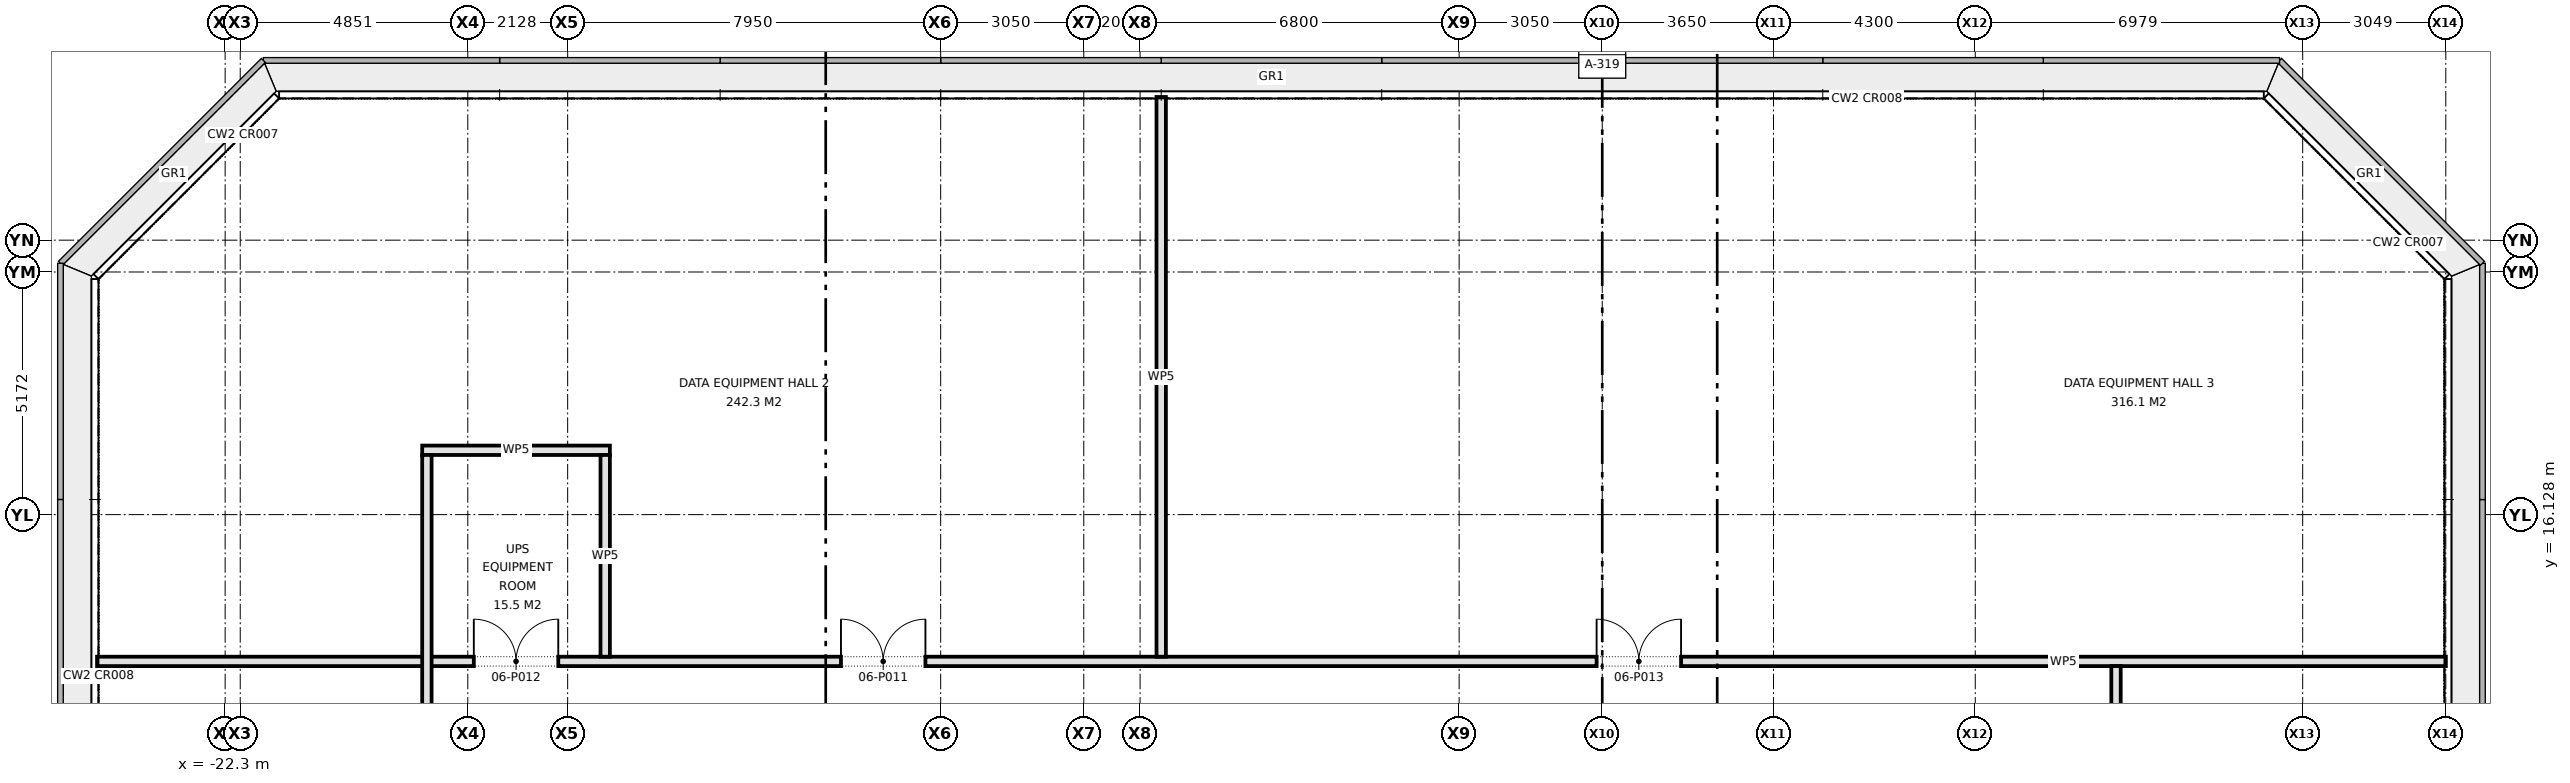
"""IFC4 building model, lengths in metres.
Left out: names, types, materials, properties, quantities, classifications, styles, units other than length and angle.
Written with IfcOpenShell. Run it as: python <this file> out.ifc"""

import sys

from ifc_helpers import new_model, si_unit, direction, frame, frame_2d, origin, place, context, subcontext, project, spatial, rectangle, extrude, element, fill, save


model = new_model("IFC4")
c1 = context("Model", 3, precision=1e-05, world=origin(), true_north=direction((0.0, 1.0)))
c2 = subcontext(c1, "Body", "Model", "MODEL_VIEW")
j1 = project(units=[si_unit("LENGTHUNIT", "METRE"), si_unit("PLANEANGLEUNIT", "RADIAN")], contexts=[c1])
p1 = place(None, origin())
s1 = spatial("IfcSite", under=j1, at=p1, CompositionType="ELEMENT")
p2 = place(p1, origin())
s2 = spatial("IfcBuilding", under=s1, at=p2, CompositionType="ELEMENT")
p3 = place(p2, frame((0.0, 0.0, 25.7)))
s3 = spatial("IfcBuildingStorey", under=s2, at=p3, CompositionType="ELEMENT", Elevation=25.7)
p4 = place(p3, frame((-25.03, 13.0, 0.0), z_axis=(0.0, 0.0, 1.0), x_axis=(1.0, 0.0, 0.0)))
e1 = element("IfcWall", 1, at=p4, inside=s3, PredefinedType="PARTITIONING", context=c2, shape_type="SweptSolid", body=[
    extrude(rectangle(XDim=50.06, YDim=0.2, at=frame_2d((25.03, 0.0))), origin(), (0.0, 0.0, 1.0), 4.575),
])
p5 = place(p4, frame((15.855, 0.0, 0.0)))
e2 = element("IfcOpeningElement", 2, at=p5, cuts=e1, PredefinedType="OPENING", context=c2, shape_type="SweptSolid", body=[
    extrude(rectangle(XDim=1.8, YDim=2.1, at=frame_2d((0.9, 1.05))), frame((0.0, 0.11, 0.0), z_axis=(0.0, -1.0, 0.0), x_axis=(1.0, 0.0, 0.0)), (0.0, 0.0, 1.0), 0.22),
])
p6 = place(p4, frame((8.03, 0.0, 0.0)))
e3 = element("IfcOpeningElement", 3, at=p6, cuts=e1, PredefinedType="OPENING", context=c2, shape_type="SweptSolid", body=[
    extrude(rectangle(XDim=1.8, YDim=2.1, at=frame_2d((0.9, 1.05))), frame((0.0, 0.11, 0.0), z_axis=(0.0, -1.0, 0.0), x_axis=(1.0, 0.0, 0.0)), (0.0, 0.0, 1.0), 0.22),
])
p7 = place(p4, frame((31.96, 0.0, 0.0)))
e4 = element("IfcOpeningElement", 4, at=p7, cuts=e1, PredefinedType="OPENING", context=c2, shape_type="SweptSolid", body=[
    extrude(rectangle(XDim=1.8, YDim=2.1, at=frame_2d((0.9, 1.05))), frame((0.0, 0.11, 0.0), z_axis=(0.0, -1.0, 0.0), x_axis=(1.0, 0.0, 0.0)), (0.0, 0.0, 1.0), 0.22),
])
p8 = place(p3, frame((-18.1, 17.5, 0.0), z_axis=(0.0, 0.0, 1.0), x_axis=(1.0, 0.0, 0.0)))
e5 = element("IfcWall", 5, at=p8, inside=s3, PredefinedType="PARTITIONING", context=c2, shape_type="SweptSolid", body=[
    extrude(rectangle(XDim=4.0, YDim=0.2, at=frame_2d((2.0, 0.0))), origin(), (0.0, 0.0, 1.0), 4.575),
])
p9 = place(p3, frame((18.0, -12.9, 0.0), z_axis=(0.0, 0.0, 1.0), x_axis=(0.0, 1.0, 0.0)))
e6 = element("IfcWall", 6, at=p9, inside=s3, PredefinedType="PARTITIONING", context=c2, shape_type="SweptSolid", body=[
    extrude(rectangle(XDim=25.8, YDim=0.2, at=frame_2d((12.9, 0.0))), origin(), (0.0, 0.0, 1.0), 4.575),
])
p10 = place(p9, frame((4.725, 0.0, 0.0)))
e7 = element("IfcOpeningElement", 7, at=p10, cuts=e6, PredefinedType="OPENING", context=c2, shape_type="SweptSolid", body=[
    extrude(rectangle(XDim=1.0, YDim=2.1, at=frame_2d((0.5, 1.05))), frame((0.0, 0.11, 0.0), z_axis=(0.0, -1.0, 0.0), x_axis=(1.0, 0.0, 0.0)), (0.0, 0.0, 1.0), 0.22),
])
p11 = place(p9, frame((14.65, 0.0, 0.0)))
e8 = element("IfcOpeningElement", 8, at=p11, cuts=e6, PredefinedType="OPENING", context=c2, shape_type="SweptSolid", body=[
    extrude(rectangle(XDim=1.2, YDim=2.1, at=frame_2d((0.6, 1.05))), frame((0.0, 0.11, 0.0), z_axis=(0.0, -1.0, 0.0), x_axis=(1.0, 0.0, 0.0)), (0.0, 0.0, 1.0), 0.22),
])
p12 = place(p9, frame((22.025, 0.0, 0.0)))
e9 = element("IfcOpeningElement", 9, at=p12, cuts=e6, PredefinedType="OPENING", context=c2, shape_type="SweptSolid", body=[
    extrude(rectangle(XDim=1.8, YDim=2.1, at=frame_2d((0.9, 1.05))), frame((0.0, 0.11, 0.0), z_axis=(0.0, -1.0, 0.0), x_axis=(1.0, 0.0, 0.0)), (0.0, 0.0, 1.0), 0.22),
])
p13 = place(p3, frame((-2.35, 13.1, 0.0), z_axis=(0.0, 0.0, 1.0), x_axis=(0.0, 1.0, 0.0)))
e10 = element("IfcWall", 10, at=p13, inside=s3, PredefinedType="PARTITIONING", context=c2, shape_type="SweptSolid", body=[
    extrude(rectangle(XDim=11.93, YDim=0.2, at=frame_2d((5.965, 0.0))), origin(), (0.0, 0.0, 1.0), 4.575),
])
p14 = place(p3, frame((-14.2, 13.1, 0.0), z_axis=(0.0, 0.0, 1.0), x_axis=(0.0, 1.0, 0.0)))
e11 = element("IfcWall", 11, at=p14, inside=s3, PredefinedType="PARTITIONING", context=c2, shape_type="SweptSolid", body=[
    extrude(rectangle(XDim=4.3, YDim=0.2, at=frame_2d((2.15, 0.0))), origin(), (0.0, 0.0, 1.0), 4.575),
])
p15 = place(p3, frame((-18.0, -12.9, 0.0), z_axis=(0.0, 0.0, 1.0), x_axis=(0.0, 1.0, 0.0)))
e12 = element("IfcWall", 12, at=p15, inside=s3, PredefinedType="PARTITIONING", context=c2, shape_type="SweptSolid", body=[
    extrude(rectangle(XDim=30.3, YDim=0.2, at=frame_2d((15.15, 0.0))), origin(), (0.0, 0.0, 1.0), 4.575),
])
p16 = place(p15, frame((6.675, 0.0, 0.0)))
e13 = element("IfcOpeningElement", 13, at=p16, cuts=e12, PredefinedType="OPENING", context=c2, shape_type="SweptSolid", body=[
    extrude(rectangle(XDim=1.8, YDim=2.1, at=frame_2d((0.9, 1.05))), frame((0.0, 0.11, 0.0), z_axis=(0.0, -1.0, 0.0), x_axis=(1.0, 0.0, 0.0)), (0.0, 0.0, 1.0), 0.22),
])
p17 = place(p15, frame((19.675, 0.0, 0.0)))
e14 = element("IfcOpeningElement", 14, at=p17, cuts=e12, PredefinedType="OPENING", context=c2, shape_type="SweptSolid", body=[
    extrude(rectangle(XDim=1.8, YDim=2.1, at=frame_2d((0.9, 1.05))), frame((0.0, 0.11, 0.0), z_axis=(0.0, -1.0, 0.0), x_axis=(1.0, 0.0, 0.0)), (0.0, 0.0, 1.0), 0.22),
])
p18 = place(p5, origin())
e15 = element("IfcDoor", 15, at=p18, inside=s3, OperationType="DOUBLE_DOOR_SINGLE_SWING", PredefinedType="DOOR", context=c2, shape_type="SweptSolid", body=[
    extrude(rectangle(XDim=1.8, YDim=2.1, at=frame_2d((0.9, 1.05))), frame((0.0, 0.025, 0.0), z_axis=(0.0, -1.0, 0.0), x_axis=(1.0, 0.0, 0.0)), (0.0, 0.0, 1.0), 0.05),
])
fill(e2, e15)
p19 = place(p6, origin())
e16 = element("IfcDoor", 16, at=p19, inside=s3, OperationType="DOUBLE_DOOR_SINGLE_SWING", PredefinedType="DOOR", context=c2, shape_type="SweptSolid", body=[
    extrude(rectangle(XDim=1.8, YDim=2.1, at=frame_2d((0.9, 1.05))), frame((0.0, 0.025, 0.0), z_axis=(0.0, -1.0, 0.0), x_axis=(1.0, 0.0, 0.0)), (0.0, 0.0, 1.0), 0.05),
])
fill(e3, e16)
p20 = place(p7, origin())
e17 = element("IfcDoor", 17, at=p20, inside=s3, OperationType="DOUBLE_DOOR_SINGLE_SWING", PredefinedType="DOOR", context=c2, shape_type="SweptSolid", body=[
    extrude(rectangle(XDim=1.8, YDim=2.1, at=frame_2d((0.9, 1.05))), frame((0.0, 0.025, 0.0), z_axis=(0.0, -1.0, 0.0), x_axis=(1.0, 0.0, 0.0)), (0.0, 0.0, 1.0), 0.05),
])
fill(e4, e17)
save(model, sys.argv[1])
